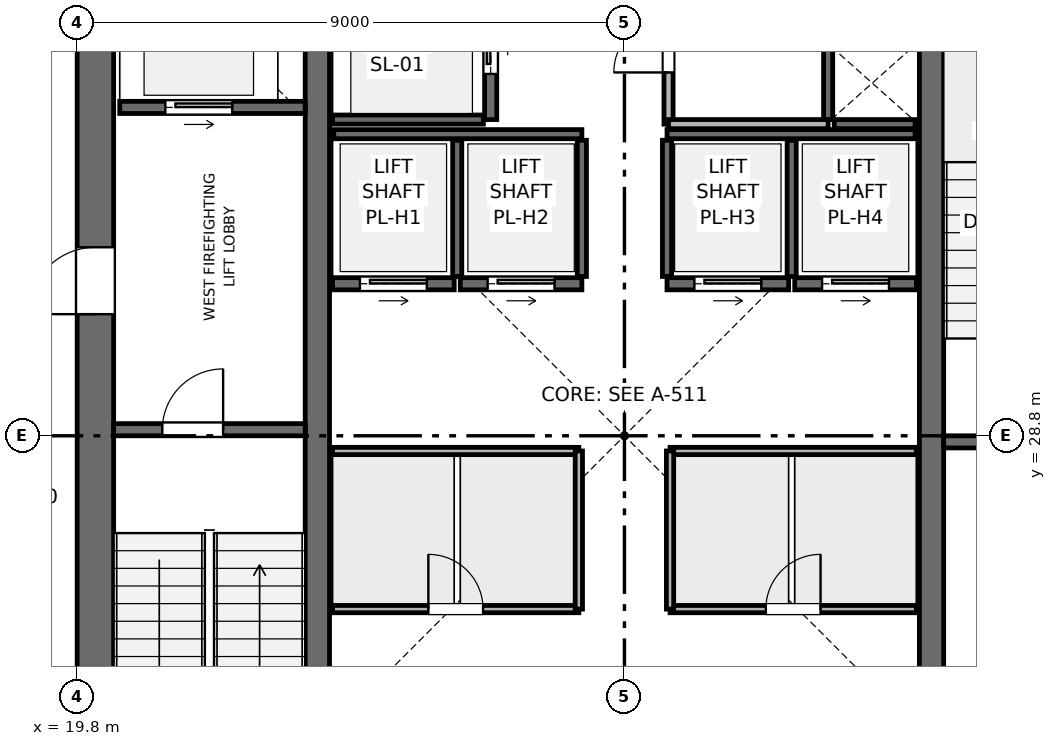
"""IFC4 building model, lengths in metres.
Left out: names, types, materials, properties, quantities, classifications, styles, units other than length and angle.
Written with IfcOpenShell. Run it as: python <this file> out.ifc"""

import sys

from ifc_helpers import new_model, si_unit, direction, frame, frame_2d, origin, place, context, subcontext, project, spatial, rectangle, extrude, element, fill, save


model = new_model("IFC4")
c1 = context("Model", 3, precision=1e-05, world=origin(), true_north=direction((0.0, 1.0)))
c2 = subcontext(c1, "Body", "Model", "MODEL_VIEW")
j1 = project(units=[si_unit("LENGTHUNIT", "METRE"), si_unit("PLANEANGLEUNIT", "RADIAN")], contexts=[c1])
p1 = place(None, origin())
s1 = spatial("IfcSite", under=j1, at=p1, CompositionType="ELEMENT")
p2 = place(p1, origin())
s2 = spatial("IfcBuilding", under=s1, at=p2, CompositionType="ELEMENT")
p3 = place(p2, frame((0.0, 0.0, 333.0)))
s3 = spatial("IfcBuildingStorey", under=s2, at=p3, CompositionType="ELEMENT", Elevation=333.0)
p4 = place(p3, frame((20.1, 20.4, 0.0), z_axis=(0.0, 0.0, 1.0), x_axis=(0.0, 1.0, 0.0)))
e1 = element("IfcWall", 1, at=p4, inside=s3, PredefinedType="SHEAR", context=c2, shape_type="SweptSolid", body=[
    extrude(rectangle(XDim=16.8, YDim=0.6, at=frame_2d((8.4, 0.0))), origin(), (0.0, 0.0, 1.0), 3.75),
])
p5 = place(p4, frame((10.4, 0.0, 0.0)))
e2 = element("IfcOpeningElement", 2, at=p5, cuts=e1, PredefinedType="OPENING", context=c2, shape_type="SweptSolid", body=[
    extrude(rectangle(XDim=1.1, YDim=2.15, at=frame_2d((0.55, 1.075))), frame((0.0, 0.31, 0.0), z_axis=(0.0, -1.0, 0.0), x_axis=(1.0, 0.0, 0.0)), (0.0, 0.0, 1.0), 0.62),
])
for number, where, z_axis, x_axis in (
    (3, (23.75, 20.4, 0.0), (0.0, 0.0, 1.0), (0.0, 1.0, 0.0)),
    (4, (33.85, 20.4, 0.0), (0.0, 0.0, 1.0), (0.0, 1.0, 0.0)),
):
    element("IfcWall", number, at=place(p3, frame(where, z_axis=z_axis, x_axis=x_axis)), inside=s3, PredefinedType="SHEAR", context=c2, shape_type="SweptSolid", body=[
        extrude(rectangle(XDim=16.8, YDim=0.4, at=frame_2d((8.4, 0.0))), origin(), (0.0, 0.0, 1.0), 3.75),
    ])
p6 = place(p3, frame((20.4, 28.9, 0.0), z_axis=(0.0, 0.0, 1.0), x_axis=(1.0, 0.0, 0.0)))
e5 = element("IfcWall", 5, at=p6, inside=s3, PredefinedType="SHEAR", context=c2, shape_type="SweptSolid", body=[
    extrude(rectangle(XDim=3.15, YDim=0.2, at=frame_2d((1.575, 0.0))), origin(), (0.0, 0.0, 1.0), 3.51),
])
p7 = place(p6, frame((0.8, 0.0, 0.0)))
e6 = element("IfcOpeningElement", 6, at=p7, cuts=e5, PredefinedType="OPENING", context=c2, shape_type="SweptSolid", body=[
    extrude(rectangle(XDim=1.0, YDim=2.1, at=frame_2d((0.5, 1.05))), frame((0.0, 0.11, 0.0), z_axis=(0.0, -1.0, 0.0), x_axis=(1.0, 0.0, 0.0)), (0.0, 0.0, 1.0), 0.22),
])
p8 = place(p3, frame((34.05, 28.7, 0.0), z_axis=(0.0, 0.0, 1.0), x_axis=(1.0, 0.0, 0.0)))
e7 = element("IfcWall", 7, at=p8, inside=s3, PredefinedType="SHEAR", context=c2, shape_type="SweptSolid", body=[
    extrude(rectangle(XDim=3.15, YDim=0.2, at=frame_2d((1.575, 0.0))), origin(), (0.0, 0.0, 1.0), 3.51),
])
p9 = place(p8, frame((0.8, 0.0, 0.0)))
e8 = element("IfcOpeningElement", 8, at=p9, cuts=e7, PredefinedType="OPENING", context=c2, shape_type="SweptSolid", body=[
    extrude(rectangle(XDim=1.0, YDim=2.1, at=frame_2d((0.5, 1.05))), frame((0.0, 0.11, 0.0), z_axis=(0.0, -1.0, 0.0), x_axis=(1.0, 0.0, 0.0)), (0.0, 0.0, 1.0), 0.22),
])
p10 = place(p3, frame((32.15, 34.0, 0.0), z_axis=(0.0, 0.0, 1.0), x_axis=(0.0, 1.0, 0.0)))
e9 = element("IfcWall", 9, at=p10, inside=s3, PredefinedType="SHEAR", context=c2, shape_type="SweptSolid", body=[
    extrude(rectangle(XDim=3.2, YDim=0.15, at=frame_2d((1.6, 0.0))), origin(), (0.0, 0.0, 1.0), 3.51),
])
p11 = place(p3, frame((32.25, 33.925, 0.0), z_axis=(0.0, 0.0, 1.0), x_axis=(1.0, 0.0, 0.0)))
e10 = element("IfcWall", 10, at=p11, inside=s3, PredefinedType="SHEAR", context=c2, shape_type="SweptSolid", body=[
    extrude(rectangle(XDim=1.33, YDim=0.15, at=frame_2d((0.665, 0.0))), origin(), (0.0, 0.0, 1.0), 3.51),
])
p12 = place(p3, frame((20.5, 34.2, 0.0), z_axis=(0.0, 0.0, 1.0), x_axis=(1.0, 0.0, 0.0)))
e11 = element("IfcWall", 11, at=p12, inside=s3, PredefinedType="SHEAR", context=c2, shape_type="SweptSolid", body=[
    extrude(rectangle(XDim=3.05, YDim=0.2, at=frame_2d((1.525, 0.0))), origin(), (0.0, 0.0, 1.0), 3.51),
])
p13 = place(p12, frame((0.75, 0.0, 0.0)))
e12 = element("IfcOpeningElement", 12, at=p13, cuts=e11, PredefinedType="OPENING", context=c2, shape_type="SweptSolid", body=[
    extrude(rectangle(XDim=1.1, YDim=2.15, at=frame_2d((0.55, 1.075))), frame((0.0, 0.11, 0.0), z_axis=(0.0, -1.0, 0.0), x_axis=(1.0, 0.0, 0.0)), (0.0, 0.0, 1.0), 0.22),
])
p14 = place(p3, frame((26.6, 34.0, 0.0), z_axis=(0.0, 0.0, 1.0), x_axis=(0.0, 1.0, 0.0)))
e13 = element("IfcWall", 13, at=p14, inside=s3, PredefinedType="SHEAR", context=c2, shape_type="SweptSolid", body=[
    extrude(rectangle(XDim=3.2, YDim=0.2, at=frame_2d((1.6, 0.0))), origin(), (0.0, 0.0, 1.0), 3.51),
])
p15 = place(p14, frame((0.75, 0.0, 0.0)))
e14 = element("IfcOpeningElement", 14, at=p15, cuts=e13, PredefinedType="OPENING", context=c2, shape_type="SweptSolid", body=[
    extrude(rectangle(XDim=1.1, YDim=2.15, at=frame_2d((0.55, 1.075))), frame((0.0, 0.11, 0.0), z_axis=(0.0, -1.0, 0.0), x_axis=(1.0, 0.0, 0.0)), (0.0, 0.0, 1.0), 0.22),
])
p16 = place(p3, frame((24.0, 34.0, 0.0), z_axis=(0.0, 0.0, 1.0), x_axis=(1.0, 0.0, 0.0)))
e15 = element("IfcWall", 15, at=p16, inside=s3, PredefinedType="SHEAR", context=c2, shape_type="SweptSolid", body=[
    extrude(rectangle(XDim=2.48, YDim=0.15, at=frame_2d((1.24, 0.0))), origin(), (0.0, 0.0, 1.0), 3.51),
])
p17 = place(p3, frame((24.0, 31.3, 0.0), z_axis=(0.0, 0.0, 1.0), x_axis=(1.0, 0.0, 0.0)))
e16 = element("IfcWall", 16, at=p17, inside=s3, PredefinedType="SHEAR", context=c2, shape_type="SweptSolid", body=[
    extrude(rectangle(XDim=2.0, YDim=0.2, at=frame_2d((1.0, 0.0))), origin(), (0.0, 0.0, 1.0), 3.51),
])
p18 = place(p17, frame((0.45, 0.0, 0.0)))
e17 = element("IfcOpeningElement", 17, at=p18, cuts=e16, PredefinedType="OPENING", context=c2, shape_type="SweptSolid", body=[
    extrude(rectangle(XDim=1.1, YDim=2.15, at=frame_2d((0.55, 1.075))), frame((0.0, 0.11, 0.0), z_axis=(0.0, -1.0, 0.0), x_axis=(1.0, 0.0, 0.0)), (0.0, 0.0, 1.0), 0.22),
])
p19 = place(p3, frame((26.1, 31.3, 0.0), z_axis=(0.0, 0.0, 1.0), x_axis=(1.0, 0.0, 0.0)))
e18 = element("IfcWall", 18, at=p19, inside=s3, PredefinedType="SHEAR", context=c2, shape_type="SweptSolid", body=[
    extrude(rectangle(XDim=2.0, YDim=0.2, at=frame_2d((1.0, 0.0))), origin(), (0.0, 0.0, 1.0), 3.51),
])
p20 = place(p19, frame((0.45, 0.0, 0.0)))
e19 = element("IfcOpeningElement", 19, at=p20, cuts=e18, PredefinedType="OPENING", context=c2, shape_type="SweptSolid", body=[
    extrude(rectangle(XDim=1.1, YDim=2.15, at=frame_2d((0.55, 1.075))), frame((0.0, 0.11, 0.0), z_axis=(0.0, -1.0, 0.0), x_axis=(1.0, 0.0, 0.0)), (0.0, 0.0, 1.0), 0.22),
])
p21 = place(p3, frame((29.5, 31.3, 0.0), z_axis=(0.0, 0.0, 1.0), x_axis=(1.0, 0.0, 0.0)))
e20 = element("IfcWall", 20, at=p21, inside=s3, PredefinedType="SHEAR", context=c2, shape_type="SweptSolid", body=[
    extrude(rectangle(XDim=2.0, YDim=0.2, at=frame_2d((1.0, 0.0))), origin(), (0.0, 0.0, 1.0), 3.51),
])
p22 = place(p21, frame((0.45, 0.0, 0.0)))
e21 = element("IfcOpeningElement", 21, at=p22, cuts=e20, PredefinedType="OPENING", context=c2, shape_type="SweptSolid", body=[
    extrude(rectangle(XDim=1.1, YDim=2.15, at=frame_2d((0.55, 1.075))), frame((0.0, 0.11, 0.0), z_axis=(0.0, -1.0, 0.0), x_axis=(1.0, 0.0, 0.0)), (0.0, 0.0, 1.0), 0.22),
])
p23 = place(p3, frame((31.6, 31.3, 0.0), z_axis=(0.0, 0.0, 1.0), x_axis=(1.0, 0.0, 0.0)))
e22 = element("IfcWall", 22, at=p23, inside=s3, PredefinedType="SHEAR", context=c2, shape_type="SweptSolid", body=[
    extrude(rectangle(XDim=2.0, YDim=0.2, at=frame_2d((1.0, 0.0))), origin(), (0.0, 0.0, 1.0), 3.51),
])
p24 = place(p23, frame((0.45, 0.0, 0.0)))
e23 = element("IfcOpeningElement", 23, at=p24, cuts=e22, PredefinedType="OPENING", context=c2, shape_type="SweptSolid", body=[
    extrude(rectangle(XDim=1.1, YDim=2.15, at=frame_2d((0.55, 1.075))), frame((0.0, 0.11, 0.0), z_axis=(0.0, -1.0, 0.0), x_axis=(1.0, 0.0, 0.0)), (0.0, 0.0, 1.0), 0.22),
])
for number, where, z_axis, x_axis in (
    (24, (24.02, 33.76, 0.0), (0.0, 0.0, 1.0), (1.0, 0.0, 0.0)),
    (25, (29.5, 33.76, 0.0), (0.0, 0.0, 1.0), (1.0, 0.0, 0.0)),
):
    element("IfcWall", number, at=place(p3, frame(where, z_axis=z_axis, x_axis=x_axis)), inside=s3, PredefinedType="SHEAR", context=c2, shape_type="SweptSolid", body=[
        extrude(rectangle(XDim=4.08, YDim=0.15, at=frame_2d((2.04, 0.0))), origin(), (0.0, 0.0, 1.0), 3.51),
    ])
for number, where, z_axis, x_axis in (
    (26, (26.05, 31.42, 0.0), (0.0, 0.0, 1.0), (0.0, 1.0, 0.0)),
    (27, (28.1, 31.42, 0.0), (0.0, 0.0, 1.0), (0.0, 1.0, 0.0)),
    (28, (29.5, 31.42, 0.0), (0.0, 0.0, 1.0), (0.0, 1.0, 0.0)),
    (29, (31.55, 31.42, 0.0), (0.0, 0.0, 1.0), (0.0, 1.0, 0.0)),
):
    element("IfcWall", number, at=place(p3, frame(where, z_axis=z_axis, x_axis=x_axis)), inside=s3, PredefinedType="SHEAR", context=c2, shape_type="SweptSolid", body=[
        extrude(rectangle(XDim=2.24, YDim=0.15, at=frame_2d((1.12, 0.0))), origin(), (0.0, 0.0, 1.0), 3.51),
    ])
p25 = place(p3, frame((29.525, 33.925, 0.0), z_axis=(0.0, 0.0, 1.0), x_axis=(0.0, 1.0, 0.0)))
e30 = element("IfcWall", 30, at=p25, inside=s3, PredefinedType="PARTITIONING", context=c2, shape_type="SweptSolid", body=[
    extrude(rectangle(XDim=3.275, YDim=0.15, at=frame_2d((1.637, 0.0))), origin(), (0.0, 0.0, 1.0), 3.51),
])
p26 = place(p25, frame((0.85, 0.0, 0.0)))
e31 = element("IfcOpeningElement", 31, at=p26, cuts=e30, PredefinedType="OPENING", context=c2, shape_type="SweptSolid", body=[
    extrude(rectangle(XDim=0.9, YDim=2.1, at=frame_2d((0.45, 1.05))), frame((0.0, 0.085, 0.0), z_axis=(0.0, -1.0, 0.0), x_axis=(1.0, 0.0, 0.0)), (0.0, 0.0, 1.0), 0.17),
])
p27 = place(p3, frame((29.525, 33.925, 0.0), z_axis=(0.0, 0.0, 1.0), x_axis=(1.0, 0.0, 0.0)))
e32 = element("IfcWall", 32, at=p27, inside=s3, PredefinedType="PARTITIONING", context=c2, shape_type="SweptSolid", body=[
    extrude(rectangle(XDim=2.625, YDim=0.15, at=frame_2d((1.312, 0.0))), origin(), (0.0, 0.0, 1.0), 3.51),
])
p28 = place(p3, frame((24.0, 25.95, 0.0), z_axis=(0.0, 0.0, 1.0), x_axis=(1.0, 0.0, 0.0)))
e33 = element("IfcWall", 33, at=p28, inside=s3, PredefinedType="PARTITIONING", context=c2, shape_type="SweptSolid", body=[
    extrude(rectangle(XDim=4.05, YDim=0.12, at=frame_2d((2.025, 0.0))), origin(), (0.0, 0.0, 1.0), 3.51),
])
p29 = place(p28, frame((1.575, 0.0, 0.0)))
e34 = element("IfcOpeningElement", 34, at=p29, cuts=e33, PredefinedType="OPENING", context=c2, shape_type="SweptSolid", body=[
    extrude(rectangle(XDim=0.9, YDim=2.1, at=frame_2d((0.45, 1.05))), frame((0.0, 0.07, 0.0), z_axis=(0.0, -1.0, 0.0), x_axis=(1.0, 0.0, 0.0)), (0.0, 0.0, 1.0), 0.14),
])
p30 = place(p3, frame((24.0, 28.55, 0.0), z_axis=(0.0, 0.0, 1.0), x_axis=(1.0, 0.0, 0.0)))
e35 = element("IfcWall", 35, at=p30, inside=s3, PredefinedType="PARTITIONING", context=c2, shape_type="SweptSolid", body=[
    extrude(rectangle(XDim=4.05, YDim=0.12, at=frame_2d((2.025, 0.0))), origin(), (0.0, 0.0, 1.0), 3.51),
])
p31 = place(p3, frame((28.05, 25.95, 0.0), z_axis=(0.0, 0.0, 1.0), x_axis=(0.0, 1.0, 0.0)))
e36 = element("IfcWall", 36, at=p31, inside=s3, PredefinedType="PARTITIONING", context=c2, shape_type="SweptSolid", body=[
    extrude(rectangle(XDim=2.6, YDim=0.12, at=frame_2d((1.3, 0.0))), origin(), (0.0, 0.0, 1.0), 3.51),
])
p32 = place(p3, frame((29.55, 25.95, 0.0), z_axis=(0.0, 0.0, 1.0), x_axis=(1.0, 0.0, 0.0)))
e37 = element("IfcWall", 37, at=p32, inside=s3, PredefinedType="PARTITIONING", context=c2, shape_type="SweptSolid", body=[
    extrude(rectangle(XDim=4.05, YDim=0.12, at=frame_2d((2.025, 0.0))), origin(), (0.0, 0.0, 1.0), 3.51),
])
p33 = place(p32, frame((1.575, 0.0, 0.0)))
e38 = element("IfcOpeningElement", 38, at=p33, cuts=e37, PredefinedType="OPENING", context=c2, shape_type="SweptSolid", body=[
    extrude(rectangle(XDim=0.9, YDim=2.1, at=frame_2d((0.45, 1.05))), frame((0.0, 0.07, 0.0), z_axis=(0.0, -1.0, 0.0), x_axis=(1.0, 0.0, 0.0)), (0.0, 0.0, 1.0), 0.14),
])
p34 = place(p3, frame((29.55, 28.55, 0.0), z_axis=(0.0, 0.0, 1.0), x_axis=(1.0, 0.0, 0.0)))
e39 = element("IfcWall", 39, at=p34, inside=s3, PredefinedType="PARTITIONING", context=c2, shape_type="SweptSolid", body=[
    extrude(rectangle(XDim=4.05, YDim=0.12, at=frame_2d((2.025, 0.0))), origin(), (0.0, 0.0, 1.0), 3.51),
])
p35 = place(p3, frame((29.55, 25.95, 0.0), z_axis=(0.0, 0.0, 1.0), x_axis=(0.0, 1.0, 0.0)))
e40 = element("IfcWall", 40, at=p35, inside=s3, PredefinedType="PARTITIONING", context=c2, shape_type="SweptSolid", body=[
    extrude(rectangle(XDim=2.6, YDim=0.12, at=frame_2d((1.3, 0.0))), origin(), (0.0, 0.0, 1.0), 3.51),
])
p36 = place(p7, origin())
e41 = element("IfcDoor", 41, at=p36, inside=s3, OperationType="SINGLE_SWING_RIGHT", PredefinedType="DOOR", context=c2, shape_type="SweptSolid", body=[
    extrude(rectangle(XDim=1.0, YDim=2.1, at=frame_2d((0.5, 1.05))), frame((0.0, 0.025, 0.0), z_axis=(0.0, -1.0, 0.0), x_axis=(1.0, 0.0, 0.0)), (0.0, 0.0, 1.0), 0.05),
])
fill(e6, e41)
p37 = place(p13, origin())
e42 = element("IfcDoor", 42, at=p37, inside=s3, OperationType="SLIDING_TO_RIGHT", PredefinedType="DOOR", context=c2, shape_type="SweptSolid", body=[
    extrude(rectangle(XDim=1.1, YDim=2.15, at=frame_2d((0.55, 1.075))), frame((0.0, 0.025, 0.0), z_axis=(0.0, -1.0, 0.0), x_axis=(1.0, 0.0, 0.0)), (0.0, 0.0, 1.0), 0.05),
])
fill(e12, e42)
p38 = place(p15, origin())
e43 = element("IfcDoor", 43, at=p38, inside=s3, OperationType="SLIDING_TO_RIGHT", PredefinedType="DOOR", context=c2, shape_type="SweptSolid", body=[
    extrude(rectangle(XDim=1.1, YDim=2.15, at=frame_2d((0.55, 1.075))), frame((0.0, 0.025, 0.0), z_axis=(0.0, -1.0, 0.0), x_axis=(1.0, 0.0, 0.0)), (0.0, 0.0, 1.0), 0.05),
])
fill(e14, e43)
p39 = place(p18, origin())
e44 = element("IfcDoor", 44, at=p39, inside=s3, OperationType="SLIDING_TO_RIGHT", PredefinedType="DOOR", context=c2, shape_type="SweptSolid", body=[
    extrude(rectangle(XDim=1.1, YDim=2.15, at=frame_2d((0.55, 1.075))), frame((0.0, 0.025, 0.0), z_axis=(0.0, -1.0, 0.0), x_axis=(1.0, 0.0, 0.0)), (0.0, 0.0, 1.0), 0.05),
])
fill(e17, e44)
p40 = place(p20, origin())
e45 = element("IfcDoor", 45, at=p40, inside=s3, OperationType="SLIDING_TO_RIGHT", PredefinedType="DOOR", context=c2, shape_type="SweptSolid", body=[
    extrude(rectangle(XDim=1.1, YDim=2.15, at=frame_2d((0.55, 1.075))), frame((0.0, 0.025, 0.0), z_axis=(0.0, -1.0, 0.0), x_axis=(1.0, 0.0, 0.0)), (0.0, 0.0, 1.0), 0.05),
])
fill(e19, e45)
p41 = place(p22, origin())
e46 = element("IfcDoor", 46, at=p41, inside=s3, OperationType="SLIDING_TO_RIGHT", PredefinedType="DOOR", context=c2, shape_type="SweptSolid", body=[
    extrude(rectangle(XDim=1.1, YDim=2.15, at=frame_2d((0.55, 1.075))), frame((0.0, 0.025, 0.0), z_axis=(0.0, -1.0, 0.0), x_axis=(1.0, 0.0, 0.0)), (0.0, 0.0, 1.0), 0.05),
])
fill(e21, e46)
p42 = place(p24, origin())
e47 = element("IfcDoor", 47, at=p42, inside=s3, OperationType="SLIDING_TO_RIGHT", PredefinedType="DOOR", context=c2, shape_type="SweptSolid", body=[
    extrude(rectangle(XDim=1.1, YDim=2.15, at=frame_2d((0.55, 1.075))), frame((0.0, 0.025, 0.0), z_axis=(0.0, -1.0, 0.0), x_axis=(1.0, 0.0, 0.0)), (0.0, 0.0, 1.0), 0.05),
])
fill(e23, e47)
p43 = place(p26, origin())
e48 = element("IfcDoor", 48, at=p43, inside=s3, OperationType="SINGLE_SWING_LEFT", PredefinedType="DOOR", context=c2, shape_type="SweptSolid", body=[
    extrude(rectangle(XDim=0.9, YDim=2.1, at=frame_2d((0.45, 1.05))), frame((0.0, 0.025, 0.0), z_axis=(0.0, -1.0, 0.0), x_axis=(1.0, 0.0, 0.0)), (0.0, 0.0, 1.0), 0.05),
])
fill(e31, e48)
p44 = place(p29, origin())
e49 = element("IfcDoor", 49, at=p44, inside=s3, OperationType="SINGLE_SWING_LEFT", PredefinedType="DOOR", context=c2, shape_type="SweptSolid", body=[
    extrude(rectangle(XDim=0.9, YDim=2.1, at=frame_2d((0.45, 1.05))), frame((0.0, 0.025, 0.0), z_axis=(0.0, -1.0, 0.0), x_axis=(1.0, 0.0, 0.0)), (0.0, 0.0, 1.0), 0.05),
])
fill(e34, e49)
p45 = place(p33, origin())
e50 = element("IfcDoor", 50, at=p45, inside=s3, OperationType="SINGLE_SWING_RIGHT", PredefinedType="DOOR", context=c2, shape_type="SweptSolid", body=[
    extrude(rectangle(XDim=0.9, YDim=2.1, at=frame_2d((0.45, 1.05))), frame((0.0, 0.025, 0.0), z_axis=(0.0, -1.0, 0.0), x_axis=(1.0, 0.0, 0.0)), (0.0, 0.0, 1.0), 0.05),
])
fill(e38, e50)
p46 = place(p5, origin())
e51 = element("IfcDoor", 51, at=p46, inside=s3, OperationType="SINGLE_SWING_LEFT", PredefinedType="DOOR", context=c2, shape_type="SweptSolid", body=[
    extrude(rectangle(XDim=1.1, YDim=2.15, at=frame_2d((0.55, 1.075))), frame((0.0, 0.025, 0.0), z_axis=(0.0, -1.0, 0.0), x_axis=(1.0, 0.0, 0.0)), (0.0, 0.0, 1.0), 0.05),
])
fill(e2, e51)
save(model, sys.argv[1])
